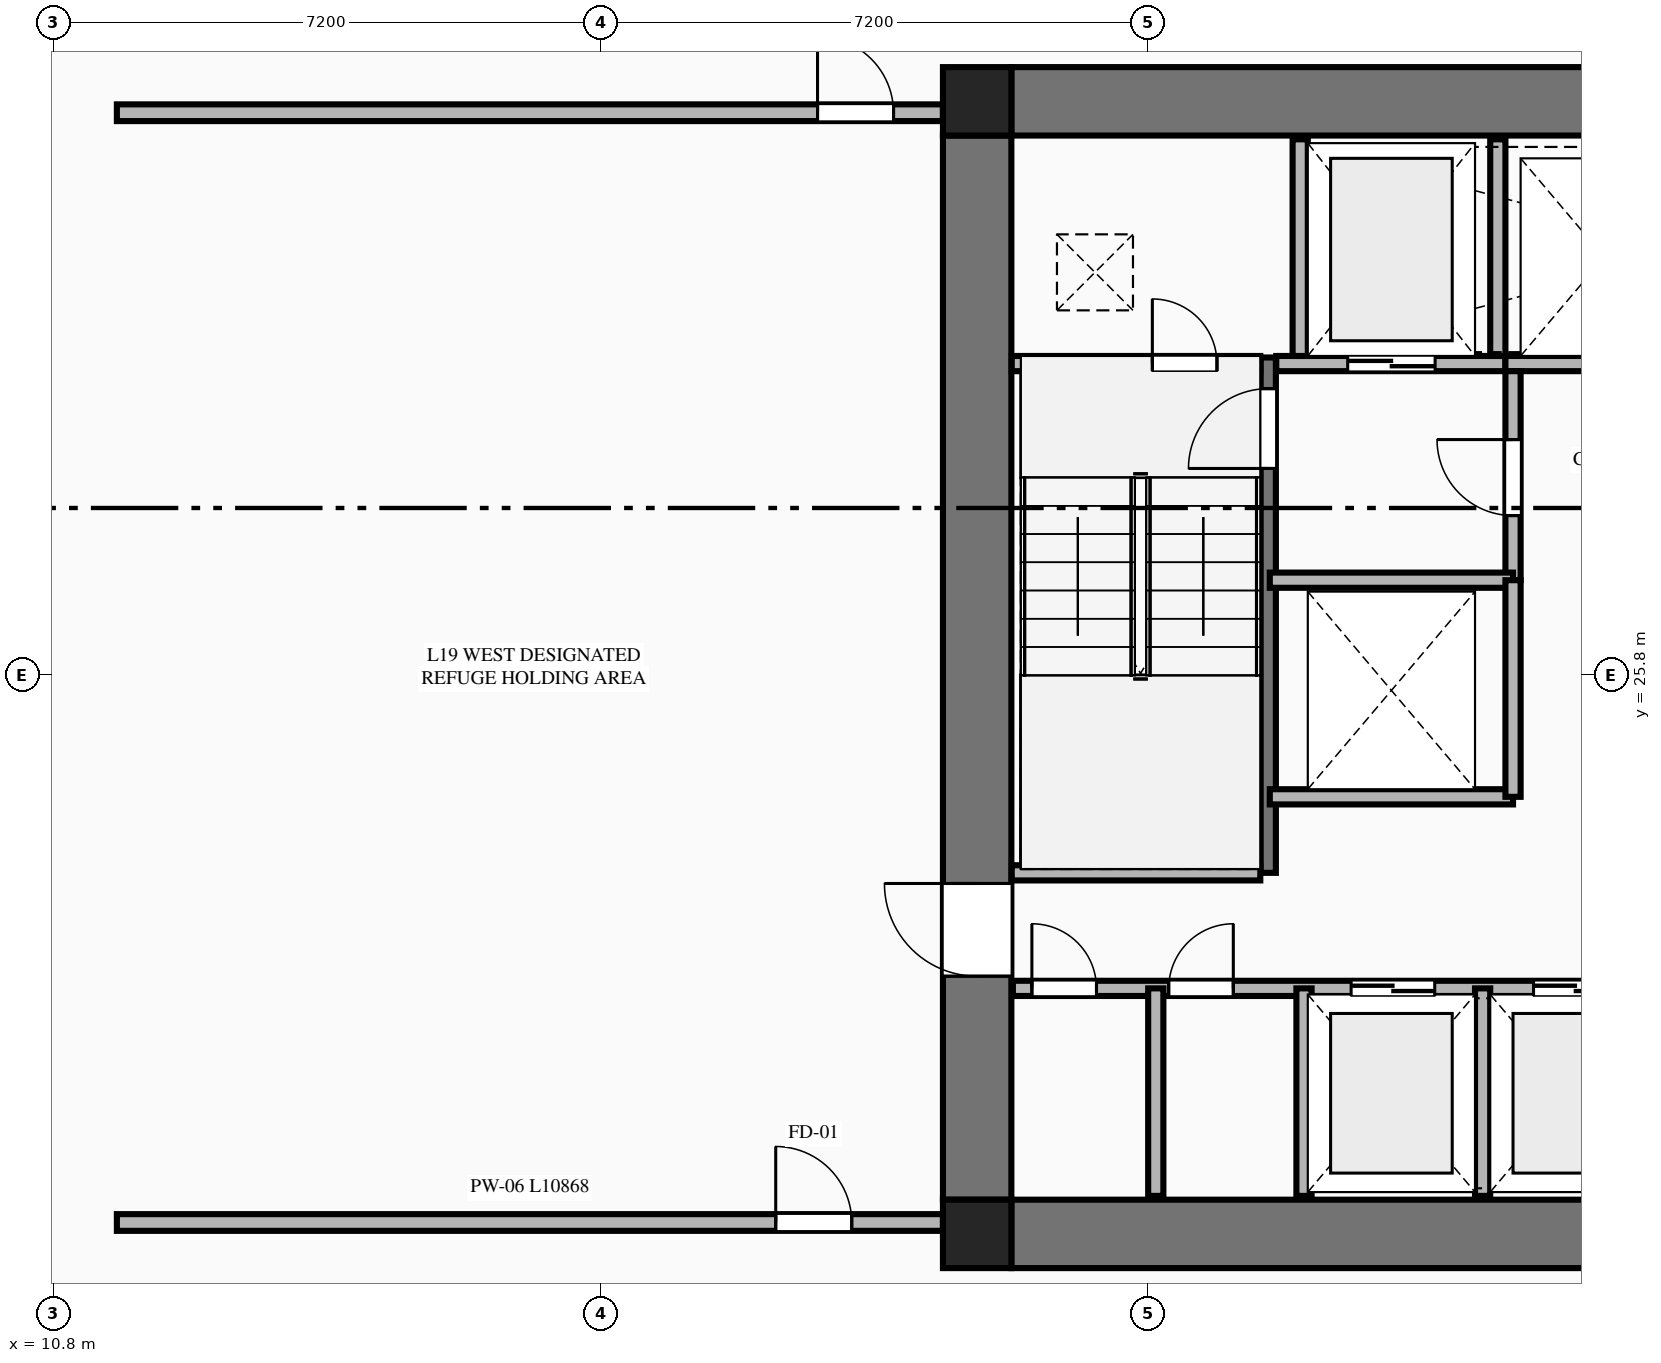
"""IFC4 building model, lengths in metres.
Left out: names, types, materials, properties, quantities, classifications, styles, units other than length and angle.
Written with IfcOpenShell. Run it as: python <this file> out.ifc"""

import sys

from ifc_helpers import new_model, si_unit, direction, frame, frame_2d, origin, origin_2d, place, context, subcontext, project, spatial, rectangle, extrude, element, fill, save


model = new_model("IFC4")
c1 = context("Model", 3, precision=1e-05, world=origin(), true_north=direction((0.0, 1.0)))
c2 = subcontext(c1, "Body", "Model", "MODEL_VIEW")
j1 = project(units=[si_unit("LENGTHUNIT", "METRE"), si_unit("PLANEANGLEUNIT", "RADIAN")], contexts=[c1])
p1 = place(None, origin())
s1 = spatial("IfcSite", under=j1, at=p1, CompositionType="ELEMENT")
p2 = place(p1, origin())
s2 = spatial("IfcBuilding", under=s1, at=p2, CompositionType="ELEMENT")
p3 = place(p2, frame((0.0, 0.0, 74.6)))
s3 = spatial("IfcBuildingStorey", under=s2, at=p3, CompositionType="ELEMENT", Elevation=74.6)
for number, where, z_axis, x_axis in (
    (1, (22.95, 18.45, 0.0), (0.0, 0.0, 1.0), (1.0, 0.0, 0.0)),
    (2, (22.95, 33.35, 0.0), (0.0, 0.0, 1.0), (1.0, 0.0, 0.0)),
):
    element("IfcColumn", number, at=place(p3, frame(where, z_axis=z_axis, x_axis=x_axis)), inside=s3, PredefinedType="COLUMN", context=c2, shape_type="SweptSolid", body=[
        extrude(rectangle(XDim=0.9, YDim=0.9, at=origin_2d()), origin(), (0.0, 0.0, 1.0), 5.4),
    ])
for number, where, z_axis, x_axis in (
    (3, (23.4, 18.45, 0.0), (0.0, 0.0, 1.0), (1.0, 0.0, 0.0)),
    (4, (23.4, 33.35, 0.0), (0.0, 0.0, 1.0), (1.0, 0.0, 0.0)),
):
    element("IfcWall", number, at=place(p3, frame(where, z_axis=z_axis, x_axis=x_axis)), inside=s3, PredefinedType="SHEAR", context=c2, shape_type="SweptSolid", body=[
        extrude(rectangle(XDim=18.0, YDim=0.9, at=frame_2d((9.0, 0.0))), origin(), (0.0, 0.0, 1.0), 5.18),
    ])
p4 = place(p3, frame((22.95, 18.9, 0.0), z_axis=(0.0, 0.0, 1.0), x_axis=(0.0, 1.0, 0.0)))
e5 = element("IfcWall", 5, at=p4, inside=s3, PredefinedType="SHEAR", context=c2, shape_type="SweptSolid", body=[
    extrude(rectangle(XDim=14.0, YDim=0.9, at=frame_2d((7.0, 0.0))), origin(), (0.0, 0.0, 1.0), 5.18),
])
p5 = place(p4, frame((2.94, 0.0, 0.0)))
e6 = element("IfcOpeningElement", 6, at=p5, cuts=e5, PredefinedType="OPENING", context=c2, shape_type="SweptSolid", body=[
    extrude(rectangle(XDim=1.22, YDim=2.25, at=frame_2d((0.61, 1.125))), frame((0.0, 0.46, 0.0), z_axis=(0.0, -1.0, 0.0), x_axis=(1.0, 0.0, 0.0)), (0.0, 0.0, 1.0), 0.92),
])
p6 = place(p3, frame((26.78, 23.2, 0.0), z_axis=(0.0, 0.0, 1.0), x_axis=(0.0, 1.0, 0.0)))
e7 = element("IfcWall", 7, at=p6, inside=s3, PredefinedType="SHEAR", context=c2, shape_type="SweptSolid", body=[
    extrude(rectangle(XDim=6.78, YDim=0.2, at=frame_2d((3.39, 0.0))), origin(), (0.0, 0.0, 1.0), 5.4),
])
p7 = place(p6, frame((5.32, 0.0, 0.0)))
e8 = element("IfcOpeningElement", 8, at=p7, cuts=e7, PredefinedType="OPENING", context=c2, shape_type="SweptSolid", body=[
    extrude(rectangle(XDim=1.05, YDim=2.15, at=frame_2d((0.525, 1.075))), frame((0.0, 0.11, 0.0), z_axis=(0.0, -1.0, 0.0), x_axis=(1.0, 0.0, 0.0)), (0.0, 0.0, 1.0), 0.22),
])
p8 = place(p3, frame((23.405, 23.2, 0.0), z_axis=(0.0, 0.0, 1.0), x_axis=(1.0, 0.0, 0.0)))
e9 = element("IfcWall", 9, at=p8, inside=s3, PredefinedType="PLUMBINGWALL", context=c2, shape_type="SweptSolid", body=[
    extrude(rectangle(XDim=3.27, YDim=0.2, at=frame_2d((1.635, 0.0))), origin(), (0.0, 0.0, 1.0), 5.18),
])
p9 = place(p3, frame((23.405, 29.9, 0.0), z_axis=(0.0, 0.0, 1.0), x_axis=(1.0, 0.0, 0.0)))
e10 = element("IfcWall", 10, at=p9, inside=s3, PredefinedType="PLUMBINGWALL", context=c2, shape_type="SweptSolid", body=[
    extrude(rectangle(XDim=3.27, YDim=0.2, at=frame_2d((1.635, 0.0))), origin(), (0.0, 0.0, 1.0), 5.18),
])
p10 = place(p9, frame((1.85, 0.0, 0.0)))
e11 = element("IfcOpeningElement", 11, at=p10, cuts=e10, PredefinedType="OPENING", context=c2, shape_type="SweptSolid", body=[
    extrude(rectangle(XDim=0.85, YDim=2.05, at=frame_2d((0.425, 1.025))), frame((0.0, 0.11, 0.0), z_axis=(0.0, -1.0, 0.0), x_axis=(1.0, 0.0, 0.0)), (0.0, 0.0, 1.0), 0.22),
])
p11 = place(p3, frame((26.885, 29.9, 0.0), z_axis=(0.0, 0.0, 1.0), x_axis=(1.0, 0.0, 0.0)))
e12 = element("IfcWall", 12, at=p11, inside=s3, PredefinedType="PLUMBINGWALL", context=c2, shape_type="SweptSolid", body=[
    extrude(rectangle(XDim=3.015, YDim=0.2, at=frame_2d((1.507, 0.0))), origin(), (0.0, 0.0, 1.0), 5.18),
])
p12 = place(p11, frame((0.94, 0.0, 0.0)))
e13 = element("IfcOpeningElement", 13, at=p12, cuts=e12, PredefinedType="OPENING", context=c2, shape_type="SweptSolid", body=[
    extrude(rectangle(XDim=1.15, YDim=2.2, at=frame_2d((0.575, 1.1))), frame((0.0, 0.11, 0.0), z_axis=(0.0, -1.0, 0.0), x_axis=(1.0, 0.0, 0.0)), (0.0, 0.0, 1.0), 0.22),
])
p13 = place(p3, frame((29.9, 29.9, 0.0), z_axis=(0.0, 0.0, 1.0), x_axis=(1.0, 0.0, 0.0)))
e14 = element("IfcWall", 14, at=p13, inside=s3, PredefinedType="PLUMBINGWALL", context=c2, shape_type="SweptSolid", body=[
    extrude(rectangle(XDim=5.0, YDim=0.2, at=frame_2d((2.5, 0.0))), origin(), (0.0, 0.0, 1.0), 5.18),
])
for number, where, z_axis, x_axis in (
    (15, (27.2, 30.0, 0.0), (0.0, 0.0, 1.0), (0.0, 1.0, 0.0)),
    (16, (29.8, 30.0, 0.0), (0.0, 0.0, 1.0), (0.0, 1.0, 0.0)),
):
    element("IfcWall", number, at=place(p3, frame(where, z_axis=z_axis, x_axis=x_axis)), inside=s3, PredefinedType="PLUMBINGWALL", context=c2, shape_type="SweptSolid", body=[
        extrude(rectangle(XDim=2.85, YDim=0.2, at=frame_2d((1.425, 0.0))), origin(), (0.0, 0.0, 1.0), 5.18),
    ])
p14 = place(p3, frame((30.0, 27.05, 0.0), z_axis=(0.0, 0.0, 1.0), x_axis=(0.0, 1.0, 0.0)))
e17 = element("IfcWall", 17, at=p14, inside=s3, PredefinedType="PLUMBINGWALL", context=c2, shape_type="SweptSolid", body=[
    extrude(rectangle(XDim=2.75, YDim=0.2, at=frame_2d((1.375, 0.0))), origin(), (0.0, 0.0, 1.0), 5.18),
])
p15 = place(p14, frame((0.85, 0.0, 0.0)))
e18 = element("IfcOpeningElement", 18, at=p15, cuts=e17, PredefinedType="OPENING", context=c2, shape_type="SweptSolid", body=[
    extrude(rectangle(XDim=1.0, YDim=2.15, at=frame_2d((0.5, 1.075))), frame((0.0, 0.11, 0.0), z_axis=(0.0, -1.0, 0.0), x_axis=(1.0, 0.0, 0.0)), (0.0, 0.0, 1.0), 0.22),
])
for number, where, z_axis, x_axis in (
    (19, (26.8, 27.05, 0.0), (0.0, 0.0, 1.0), (1.0, 0.0, 0.0)),
    (20, (26.8, 24.2, 0.0), (0.0, 0.0, 1.0), (1.0, 0.0, 0.0)),
):
    element("IfcWall", number, at=place(p3, frame(where, z_axis=z_axis, x_axis=x_axis)), inside=s3, PredefinedType="PLUMBINGWALL", context=c2, shape_type="SweptSolid", body=[
        extrude(rectangle(XDim=3.2, YDim=0.2, at=frame_2d((1.6, 0.0))), origin(), (0.0, 0.0, 1.0), 5.18),
    ])
p16 = place(p3, frame((30.0, 24.2, 0.0), z_axis=(0.0, 0.0, 1.0), x_axis=(0.0, 1.0, 0.0)))
e21 = element("IfcWall", 21, at=p16, inside=s3, PredefinedType="PLUMBINGWALL", context=c2, shape_type="SweptSolid", body=[
    extrude(rectangle(XDim=2.85, YDim=0.2, at=frame_2d((1.425, 0.0))), origin(), (0.0, 0.0, 1.0), 5.18),
])
p17 = place(p3, frame((23.42, 21.68, 0.0), z_axis=(0.0, 0.0, 1.0), x_axis=(1.0, 0.0, 0.0)))
e22 = element("IfcWall", 22, at=p17, inside=s3, PredefinedType="PLUMBINGWALL", context=c2, shape_type="SweptSolid", body=[
    extrude(rectangle(XDim=17.96, YDim=0.2, at=frame_2d((8.98, 0.0))), origin(), (0.0, 0.0, 1.0), 5.18),
])
p18 = place(p17, frame((4.45, 0.0, 0.0)))
e23 = element("IfcOpeningElement", 23, at=p18, cuts=e22, PredefinedType="OPENING", context=c2, shape_type="SweptSolid", body=[
    extrude(rectangle(XDim=1.1, YDim=2.2, at=frame_2d((0.55, 1.1))), frame((0.0, 0.11, 0.0), z_axis=(0.0, -1.0, 0.0), x_axis=(1.0, 0.0, 0.0)), (0.0, 0.0, 1.0), 0.22),
])
p19 = place(p17, frame((6.85, 0.0, 0.0)))
e24 = element("IfcOpeningElement", 24, at=p19, cuts=e22, PredefinedType="OPENING", context=c2, shape_type="SweptSolid", body=[
    extrude(rectangle(XDim=1.1, YDim=2.2, at=frame_2d((0.55, 1.1))), frame((0.0, 0.11, 0.0), z_axis=(0.0, -1.0, 0.0), x_axis=(1.0, 0.0, 0.0)), (0.0, 0.0, 1.0), 0.22),
])
p20 = place(p17, frame((9.25, 0.0, 0.0)))
e25 = element("IfcOpeningElement", 25, at=p20, cuts=e22, PredefinedType="OPENING", context=c2, shape_type="SweptSolid", body=[
    extrude(rectangle(XDim=1.1, YDim=2.2, at=frame_2d((0.55, 1.1))), frame((0.0, 0.11, 0.0), z_axis=(0.0, -1.0, 0.0), x_axis=(1.0, 0.0, 0.0)), (0.0, 0.0, 1.0), 0.22),
])
p21 = place(p17, frame((0.25, 0.0, 0.0)))
e26 = element("IfcOpeningElement", 26, at=p21, cuts=e22, PredefinedType="OPENING", context=c2, shape_type="SweptSolid", body=[
    extrude(rectangle(XDim=0.85, YDim=2.05, at=frame_2d((0.425, 1.025))), frame((0.0, 0.11, 0.0), z_axis=(0.0, -1.0, 0.0), x_axis=(1.0, 0.0, 0.0)), (0.0, 0.0, 1.0), 0.22),
])
p22 = place(p17, frame((2.05, 0.0, 0.0)))
e27 = element("IfcOpeningElement", 27, at=p22, cuts=e22, PredefinedType="OPENING", context=c2, shape_type="SweptSolid", body=[
    extrude(rectangle(XDim=0.85, YDim=2.05, at=frame_2d((0.425, 1.025))), frame((0.0, 0.11, 0.0), z_axis=(0.0, -1.0, 0.0), x_axis=(1.0, 0.0, 0.0)), (0.0, 0.0, 1.0), 0.22),
])
p23 = place(p17, frame((14.6, 0.0, 0.0)))
e28 = element("IfcOpeningElement", 28, at=p23, cuts=e22, PredefinedType="OPENING", context=c2, shape_type="SweptSolid", body=[
    extrude(rectangle(XDim=0.85, YDim=2.05, at=frame_2d((0.425, 1.025))), frame((0.0, 0.11, 0.0), z_axis=(0.0, -1.0, 0.0), x_axis=(1.0, 0.0, 0.0)), (0.0, 0.0, 1.0), 0.22),
])
for number, where, z_axis, x_axis in (
    (29, (27.25, 18.95, 0.0), (0.0, 0.0, 1.0), (0.0, 1.0, 0.0)),
    (30, (29.6, 18.95, 0.0), (0.0, 0.0, 1.0), (0.0, 1.0, 0.0)),
    (31, (25.3, 18.95, 0.0), (0.0, 0.0, 1.0), (0.0, 1.0, 0.0)),
):
    element("IfcWall", number, at=place(p3, frame(where, z_axis=z_axis, x_axis=x_axis)), inside=s3, PredefinedType="PLUMBINGWALL", context=c2, shape_type="SweptSolid", body=[
        extrude(rectangle(XDim=2.73, YDim=0.2, at=frame_2d((1.365, 0.0))), origin(), (0.0, 0.0, 1.0), 5.18),
    ])
p24 = place(p3, frame((11.632, 18.6, 0.0), z_axis=(0.0, 0.0, 1.0), x_axis=(1.0, 0.0, 0.0)))
e32 = element("IfcWall", 32, at=p24, inside=s3, PredefinedType="PARTITIONING", context=c2, shape_type="SweptSolid", body=[
    extrude(rectangle(XDim=10.868, YDim=0.22, at=frame_2d((5.434, 0.0))), origin(), (0.0, 0.0, 1.0), 4.487),
])
p25 = place(p24, frame((8.668, 0.0, 0.0)))
e33 = element("IfcOpeningElement", 33, at=p25, cuts=e32, PredefinedType="OPENING", context=c2, shape_type="SweptSolid", body=[
    extrude(rectangle(XDim=1.0, YDim=2.15, at=frame_2d((0.5, 1.075))), frame((0.0, 0.12, 0.0), z_axis=(0.0, -1.0, 0.0), x_axis=(1.0, 0.0, 0.0)), (0.0, 0.0, 1.0), 0.24),
])
p26 = place(p3, frame((11.632, 33.2, 0.0), z_axis=(0.0, 0.0, 1.0), x_axis=(1.0, 0.0, 0.0)))
e34 = element("IfcWall", 34, at=p26, inside=s3, PredefinedType="PARTITIONING", context=c2, shape_type="SweptSolid", body=[
    extrude(rectangle(XDim=10.868, YDim=0.22, at=frame_2d((5.434, 0.0))), origin(), (0.0, 0.0, 1.0), 4.487),
])
p27 = place(p26, frame((9.218, 0.0, 0.0)))
e35 = element("IfcOpeningElement", 35, at=p27, cuts=e34, PredefinedType="OPENING", context=c2, shape_type="SweptSolid", body=[
    extrude(rectangle(XDim=1.0, YDim=2.15, at=frame_2d((0.5, 1.075))), frame((0.0, 0.12, 0.0), z_axis=(0.0, -1.0, 0.0), x_axis=(1.0, 0.0, 0.0)), (0.0, 0.0, 1.0), 0.24),
])
p28 = place(p5, origin())
e36 = element("IfcDoor", 36, at=p28, inside=s3, OperationType="SINGLE_SWING_RIGHT", PredefinedType="DOOR", context=c2, shape_type="SweptSolid", body=[
    extrude(rectangle(XDim=1.22, YDim=2.25, at=frame_2d((0.61, 1.125))), frame((0.0, 0.025, 0.0), z_axis=(0.0, -1.0, 0.0), x_axis=(1.0, 0.0, 0.0)), (0.0, 0.0, 1.0), 0.05),
])
fill(e6, e36)
p29 = place(p7, origin())
e37 = element("IfcDoor", 37, at=p29, inside=s3, OperationType="SINGLE_SWING_LEFT", PredefinedType="DOOR", context=c2, shape_type="SweptSolid", body=[
    extrude(rectangle(XDim=1.05, YDim=2.15, at=frame_2d((0.525, 1.075))), frame((0.0, 0.025, 0.0), z_axis=(0.0, -1.0, 0.0), x_axis=(1.0, 0.0, 0.0)), (0.0, 0.0, 1.0), 0.05),
])
fill(e8, e37)
p30 = place(p10, origin())
e38 = element("IfcDoor", 38, at=p30, inside=s3, OperationType="SINGLE_SWING_LEFT", PredefinedType="DOOR", context=c2, shape_type="SweptSolid", body=[
    extrude(rectangle(XDim=0.85, YDim=2.05, at=frame_2d((0.425, 1.025))), frame((0.0, 0.025, 0.0), z_axis=(0.0, -1.0, 0.0), x_axis=(1.0, 0.0, 0.0)), (0.0, 0.0, 1.0), 0.05),
])
fill(e11, e38)
p31 = place(p12, origin())
e39 = element("IfcDoor", 39, at=p31, inside=s3, OperationType="DOUBLE_DOOR_SLIDING", PredefinedType="DOOR", context=c2, shape_type="SweptSolid", body=[
    extrude(rectangle(XDim=1.15, YDim=2.2, at=frame_2d((0.575, 1.1))), frame((0.0, 0.025, 0.0), z_axis=(0.0, -1.0, 0.0), x_axis=(1.0, 0.0, 0.0)), (0.0, 0.0, 1.0), 0.05),
])
fill(e13, e39)
p32 = place(p15, origin())
e40 = element("IfcDoor", 40, at=p32, inside=s3, OperationType="SINGLE_SWING_RIGHT", PredefinedType="DOOR", context=c2, shape_type="SweptSolid", body=[
    extrude(rectangle(XDim=1.0, YDim=2.15, at=frame_2d((0.5, 1.075))), frame((0.0, 0.025, 0.0), z_axis=(0.0, -1.0, 0.0), x_axis=(1.0, 0.0, 0.0)), (0.0, 0.0, 1.0), 0.05),
])
fill(e18, e40)
p33 = place(p18, origin())
e41 = element("IfcDoor", 41, at=p33, inside=s3, OperationType="DOUBLE_DOOR_SLIDING", PredefinedType="DOOR", context=c2, shape_type="SweptSolid", body=[
    extrude(rectangle(XDim=1.1, YDim=2.2, at=frame_2d((0.55, 1.1))), frame((0.0, 0.025, 0.0), z_axis=(0.0, -1.0, 0.0), x_axis=(1.0, 0.0, 0.0)), (0.0, 0.0, 1.0), 0.05),
])
fill(e23, e41)
p34 = place(p19, origin())
e42 = element("IfcDoor", 42, at=p34, inside=s3, OperationType="DOUBLE_DOOR_SLIDING", PredefinedType="DOOR", context=c2, shape_type="SweptSolid", body=[
    extrude(rectangle(XDim=1.1, YDim=2.2, at=frame_2d((0.55, 1.1))), frame((0.0, 0.025, 0.0), z_axis=(0.0, -1.0, 0.0), x_axis=(1.0, 0.0, 0.0)), (0.0, 0.0, 1.0), 0.05),
])
fill(e24, e42)
p35 = place(p21, origin())
e43 = element("IfcDoor", 43, at=p35, inside=s3, OperationType="SINGLE_SWING_LEFT", PredefinedType="DOOR", context=c2, shape_type="SweptSolid", body=[
    extrude(rectangle(XDim=0.85, YDim=2.05, at=frame_2d((0.425, 1.025))), frame((0.0, 0.025, 0.0), z_axis=(0.0, -1.0, 0.0), x_axis=(1.0, 0.0, 0.0)), (0.0, 0.0, 1.0), 0.05),
])
fill(e26, e43)
p36 = place(p22, origin())
e44 = element("IfcDoor", 44, at=p36, inside=s3, OperationType="SINGLE_SWING_RIGHT", PredefinedType="DOOR", context=c2, shape_type="SweptSolid", body=[
    extrude(rectangle(XDim=0.85, YDim=2.05, at=frame_2d((0.425, 1.025))), frame((0.0, 0.025, 0.0), z_axis=(0.0, -1.0, 0.0), x_axis=(1.0, 0.0, 0.0)), (0.0, 0.0, 1.0), 0.05),
])
fill(e27, e44)
p37 = place(p25, origin())
e45 = element("IfcDoor", 45, at=p37, inside=s3, OperationType="SINGLE_SWING_LEFT", PredefinedType="DOOR", context=c2, shape_type="SweptSolid", body=[
    extrude(rectangle(XDim=1.0, YDim=2.15, at=frame_2d((0.5, 1.075))), frame((0.0, 0.025, 0.0), z_axis=(0.0, -1.0, 0.0), x_axis=(1.0, 0.0, 0.0)), (0.0, 0.0, 1.0), 0.05),
])
fill(e33, e45)
p38 = place(p27, origin())
e46 = element("IfcDoor", 46, at=p38, inside=s3, OperationType="SINGLE_SWING_LEFT", PredefinedType="DOOR", context=c2, shape_type="SweptSolid", body=[
    extrude(rectangle(XDim=1.0, YDim=2.15, at=frame_2d((0.5, 1.075))), frame((0.0, 0.025, 0.0), z_axis=(0.0, -1.0, 0.0), x_axis=(1.0, 0.0, 0.0)), (0.0, 0.0, 1.0), 0.05),
])
fill(e35, e46)
save(model, sys.argv[1])
